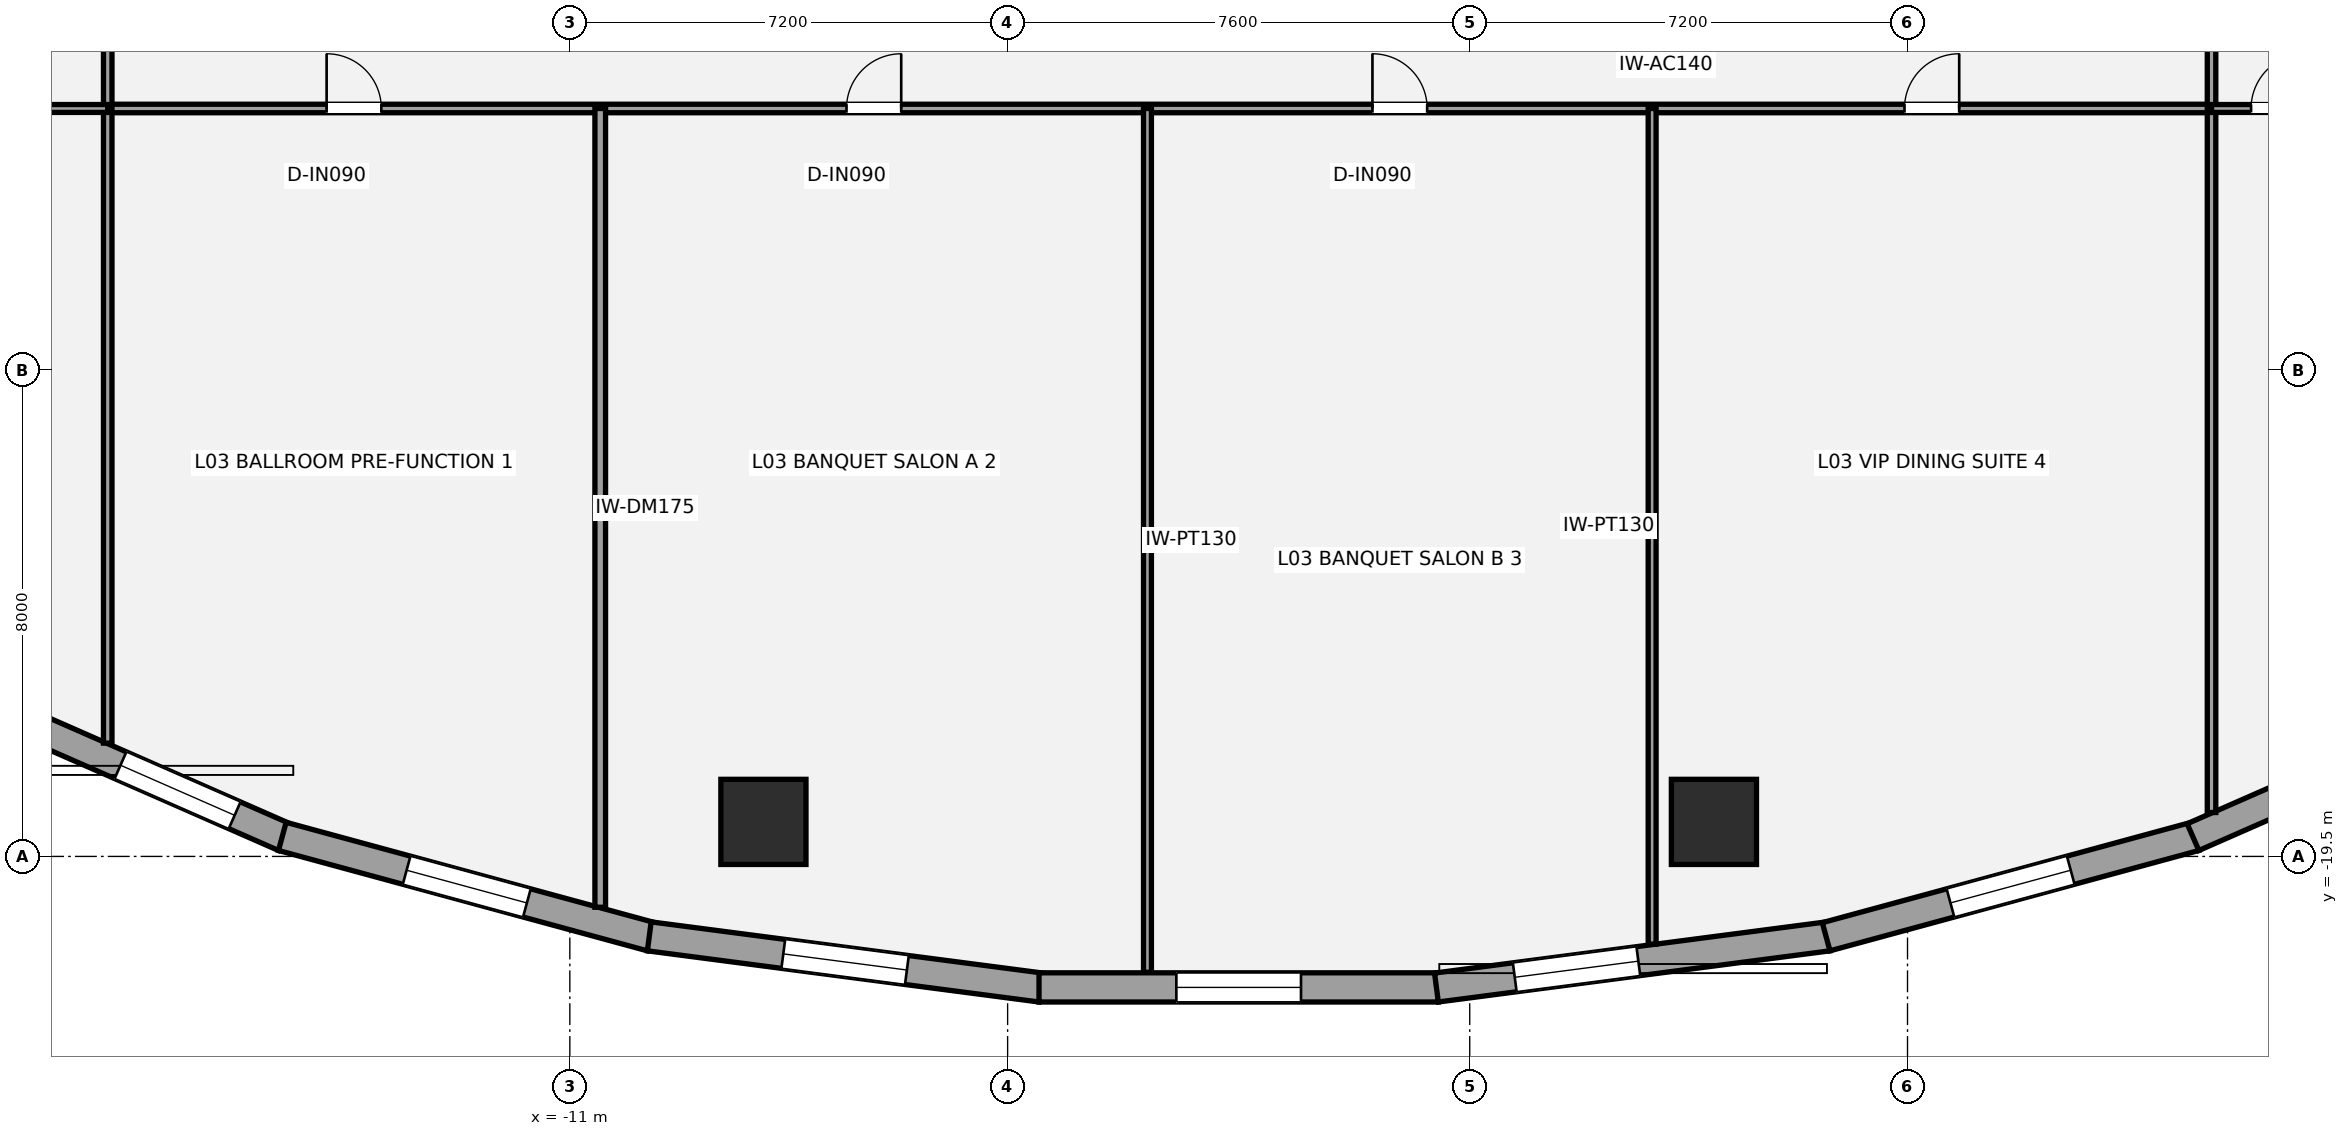
"""IFC4 building model, lengths in metres.
Left out: names, types, materials, properties, quantities, classifications, styles, units other than length and angle.
Written with IfcOpenShell. Run it as: python <this file> out.ifc"""

import sys

from ifc_helpers import new_model, si_unit, direction, frame, frame_2d, origin, origin_2d, place, context, subcontext, project, spatial, rectangle, hollow_circle, extrude, element, fill, save


model = new_model("IFC4")
c1 = context("Model", 3, precision=1e-05, world=origin(), true_north=direction((0.0, 1.0)))
c2 = subcontext(c1, "Body", "Model", "MODEL_VIEW")
j1 = project(units=[si_unit("LENGTHUNIT", "METRE"), si_unit("PLANEANGLEUNIT", "RADIAN")], contexts=[c1])
p1 = place(None, origin())
s1 = spatial("IfcSite", under=j1, at=p1, CompositionType="ELEMENT")
p2 = place(p1, origin())
s2 = spatial("IfcBuilding", under=s1, at=p2, CompositionType="ELEMENT")
p3 = place(p2, frame((0.0, 0.0, 14.4)))
s3 = spatial("IfcBuildingStorey", under=s2, at=p3, CompositionType="ELEMENT", Elevation=14.4)
for number, where, z_axis, x_axis in (
    (1, (-7.816, -18.932, 0.0), (0.0, 0.0, 1.0), (1.0, 0.0, 0.0)),
    (2, (7.816, -18.932, 0.0), (0.0, 0.0, 1.0), (1.0, 0.0, 0.0)),
):
    element("IfcColumn", number, at=place(p3, frame(where, z_axis=z_axis, x_axis=x_axis)), inside=s3, PredefinedType="USERDEFINED", context=c2, shape_type="SweptSolid", body=[
        extrude(hollow_circle(Radius=0.7, WallThickness=0.05, at=origin_2d()), origin(), (0.0, 0.0, 1.0), 4.2),
    ])
p4 = place(p3, frame((-15.695, -19.183, 0.0), z_axis=(0.0, 0.0, 1.0), x_axis=(-0.91570760638, 0.401845218484, 0.0)))
e3 = element("IfcWall", 3, at=p4, inside=s3, PredefinedType="STANDARD", context=c2, shape_type="SweptSolid", body=[
    extrude(rectangle(XDim=5.963, YDim=0.48, at=frame_2d((2.981, 0.0))), origin(), (0.0, 0.0, 1.0), 3.109),
])
p5 = place(p4, frame((0.893, 0.0, 0.72)))
e4 = element("IfcOpeningElement", 4, at=p5, cuts=e3, PredefinedType="OPENING", context=c2, shape_type="SweptSolid", body=[
    extrude(rectangle(XDim=2.05, YDim=1.8, at=frame_2d((1.025, 0.9))), frame((0.0, 0.25, 0.0), z_axis=(0.0, -1.0, 0.0), x_axis=(1.0, 0.0, 0.0)), (0.0, 0.0, 1.0), 0.5),
])
p6 = place(p3, frame((-9.662, -20.821, 0.0), z_axis=(0.0, 0.0, 1.0), x_axis=(-0.964936550718, 0.262483243445, 0.0)))
e5 = element("IfcWall", 5, at=p6, inside=s3, PredefinedType="STANDARD", context=c2, shape_type="SweptSolid", body=[
    extrude(rectangle(XDim=6.288, YDim=0.48, at=frame_2d((3.144, 0.0))), origin(), (0.0, 0.0, 1.0), 3.109),
])
p7 = place(p6, frame((2.119, 0.0, 0.72)))
e6 = element("IfcOpeningElement", 6, at=p7, cuts=e5, PredefinedType="OPENING", context=c2, shape_type="SweptSolid", body=[
    extrude(rectangle(XDim=2.05, YDim=1.8, at=frame_2d((1.025, 0.9))), frame((0.0, 0.25, 0.0), z_axis=(0.0, -1.0, 0.0), x_axis=(1.0, 0.0, 0.0)), (0.0, 0.0, 1.0), 0.5),
])
p8 = place(p3, frame((-3.252, -21.656, 0.0), z_axis=(0.0, 0.0, 1.0), x_axis=(-0.991576921472, 0.129519144545, 0.0)))
e7 = element("IfcWall", 7, at=p8, inside=s3, PredefinedType="STANDARD", context=c2, shape_type="SweptSolid", body=[
    extrude(rectangle(XDim=6.496, YDim=0.48, at=frame_2d((3.248, 0.0))), origin(), (0.0, 0.0, 1.0), 3.109),
])
p9 = place(p8, frame((2.223, 0.0, 0.72)))
e8 = element("IfcOpeningElement", 8, at=p9, cuts=e7, PredefinedType="OPENING", context=c2, shape_type="SweptSolid", body=[
    extrude(rectangle(XDim=2.05, YDim=1.8, at=frame_2d((1.025, 0.9))), frame((0.0, 0.25, 0.0), z_axis=(0.0, -1.0, 0.0), x_axis=(1.0, 0.0, 0.0)), (0.0, 0.0, 1.0), 0.5),
])
p10 = place(p3, frame((3.284, -21.654, 0.0), z_axis=(0.0, 0.0, 1.0), x_axis=(-1.0, 0.0, 0.0)))
e9 = element("IfcWall", 9, at=p10, inside=s3, PredefinedType="STANDARD", context=c2, shape_type="SweptSolid", body=[
    extrude(rectangle(XDim=6.567, YDim=0.48, at=frame_2d((3.284, 0.0))), origin(), (0.0, 0.0, 1.0), 3.109),
])
p11 = place(p10, frame((2.259, 0.0, 0.72)))
e10 = element("IfcOpeningElement", 10, at=p11, cuts=e9, PredefinedType="OPENING", context=c2, shape_type="SweptSolid", body=[
    extrude(rectangle(XDim=2.05, YDim=1.8, at=frame_2d((1.025, 0.9))), frame((0.0, 0.25, 0.0), z_axis=(0.0, -1.0, 0.0), x_axis=(1.0, 0.0, 0.0)), (0.0, 0.0, 1.0), 0.5),
])
p12 = place(p3, frame((9.693, -20.815, 0.0), z_axis=(0.0, 0.0, 1.0), x_axis=(-0.991576921472, -0.129519144545, 0.0)))
e11 = element("IfcWall", 11, at=p12, inside=s3, PredefinedType="STANDARD", context=c2, shape_type="SweptSolid", body=[
    extrude(rectangle(XDim=6.496, YDim=0.48, at=frame_2d((3.248, 0.0))), origin(), (0.0, 0.0, 1.0), 3.109),
])
p13 = place(p12, frame((3.147, 0.0, 0.72)))
e12 = element("IfcOpeningElement", 12, at=p13, cuts=e11, PredefinedType="OPENING", context=c2, shape_type="SweptSolid", body=[
    extrude(rectangle(XDim=2.05, YDim=1.8, at=frame_2d((1.025, 0.9))), frame((0.0, 0.25, 0.0), z_axis=(0.0, -1.0, 0.0), x_axis=(1.0, 0.0, 0.0)), (0.0, 0.0, 1.0), 0.5),
])
p14 = place(p3, frame((15.729, -19.171, 0.0), z_axis=(0.0, 0.0, 1.0), x_axis=(-0.964936550718, -0.262483243445, 0.0)))
e13 = element("IfcWall", 13, at=p14, inside=s3, PredefinedType="STANDARD", context=c2, shape_type="SweptSolid", body=[
    extrude(rectangle(XDim=6.288, YDim=0.48, at=frame_2d((3.144, 0.0))), origin(), (0.0, 0.0, 1.0), 3.109),
])
p15 = place(p14, frame((2.119, 0.0, 0.72)))
e14 = element("IfcOpeningElement", 14, at=p15, cuts=e13, PredefinedType="OPENING", context=c2, shape_type="SweptSolid", body=[
    extrude(rectangle(XDim=2.05, YDim=1.8, at=frame_2d((1.025, 0.9))), frame((0.0, 0.25, 0.0), z_axis=(0.0, -1.0, 0.0), x_axis=(1.0, 0.0, 0.0)), (0.0, 0.0, 1.0), 0.5),
])
p16 = place(p3, frame((21.156, -16.786, 0.0), z_axis=(0.0, 0.0, 1.0), x_axis=(-0.91570760638, -0.401845218484, 0.0)))
e15 = element("IfcWall", 15, at=p16, inside=s3, PredefinedType="STANDARD", context=c2, shape_type="SweptSolid", body=[
    extrude(rectangle(XDim=5.963, YDim=0.48, at=frame_2d((2.981, 0.0))), origin(), (0.0, 0.0, 1.0), 3.109),
])
p17 = place(p16, frame((1.957, 0.0, 0.72)))
e16 = element("IfcOpeningElement", 16, at=p17, cuts=e15, PredefinedType="OPENING", context=c2, shape_type="SweptSolid", body=[
    extrude(rectangle(XDim=2.05, YDim=1.8, at=frame_2d((1.025, 0.9))), frame((0.0, 0.25, 0.0), z_axis=(0.0, -1.0, 0.0), x_axis=(1.0, 0.0, 0.0)), (0.0, 0.0, 1.0), 0.5),
])
p18 = place(p3, frame((-18.6, -7.2, 0.0), z_axis=(0.0, 0.0, 1.0), x_axis=(1.0, 0.0, 0.0)))
e17 = element("IfcWall", 17, at=p18, inside=s3, PredefinedType="PARTITIONING", context=c2, shape_type="SweptSolid", body=[
    extrude(rectangle(XDim=34.6, YDim=0.14, at=frame_2d((17.3, 0.0))), origin(), (0.0, 0.0, 1.0), 3.98),
])
p19 = place(p18, frame((3.6, 0.0, 0.0)))
e18 = element("IfcOpeningElement", 18, at=p19, cuts=e17, PredefinedType="OPENING", context=c2, shape_type="SweptSolid", body=[
    extrude(rectangle(XDim=0.9, YDim=2.1, at=frame_2d((0.45, 1.05))), frame((0.0, 0.08, 0.0), z_axis=(0.0, -1.0, 0.0), x_axis=(1.0, 0.0, 0.0)), (0.0, 0.0, 1.0), 0.16),
])
p20 = place(p18, frame((12.15, 0.0, 0.0)))
e19 = element("IfcOpeningElement", 19, at=p20, cuts=e17, PredefinedType="OPENING", context=c2, shape_type="SweptSolid", body=[
    extrude(rectangle(XDim=0.9, YDim=2.1, at=frame_2d((0.45, 1.05))), frame((0.0, 0.08, 0.0), z_axis=(0.0, -1.0, 0.0), x_axis=(1.0, 0.0, 0.0)), (0.0, 0.0, 1.0), 0.16),
])
p21 = place(p18, frame((20.8, 0.0, 0.0)))
e20 = element("IfcOpeningElement", 20, at=p21, cuts=e17, PredefinedType="OPENING", context=c2, shape_type="SweptSolid", body=[
    extrude(rectangle(XDim=0.9, YDim=2.1, at=frame_2d((0.45, 1.05))), frame((0.0, 0.08, 0.0), z_axis=(0.0, -1.0, 0.0), x_axis=(1.0, 0.0, 0.0)), (0.0, 0.0, 1.0), 0.16),
])
p22 = place(p18, frame((29.55, 0.0, 0.0)))
e21 = element("IfcOpeningElement", 21, at=p22, cuts=e17, PredefinedType="OPENING", context=c2, shape_type="SweptSolid", body=[
    extrude(rectangle(XDim=0.9, YDim=2.1, at=frame_2d((0.45, 1.05))), frame((0.0, 0.08, 0.0), z_axis=(0.0, -1.0, 0.0), x_axis=(1.0, 0.0, 0.0)), (0.0, 0.0, 1.0), 0.16),
])
p23 = place(p3, frame((-18.6, -17.637, 0.0), z_axis=(0.0, 0.0, 1.0), x_axis=(0.0, 1.0, 0.0)))
e22 = element("IfcWall", 22, at=p23, inside=s3, PredefinedType="PARTITIONING", context=c2, shape_type="SweptSolid", body=[
    extrude(rectangle(XDim=25.187, YDim=0.14, at=frame_2d((12.594, 0.0))), origin(), (0.0, 0.0, 1.0), 3.348),
])
p24 = place(p23, frame((14.487, 0.0, 0.0)))
e23 = element("IfcOpeningElement", 23, at=p24, cuts=e22, PredefinedType="OPENING", context=c2, shape_type="SweptSolid", body=[
    extrude(rectangle(XDim=0.9, YDim=2.1, at=frame_2d((0.45, 1.05))), frame((0.0, 0.08, 0.0), z_axis=(0.0, -1.0, 0.0), x_axis=(1.0, 0.0, 0.0)), (0.0, 0.0, 1.0), 0.16),
])
p25 = place(p23, frame((21.862, 0.0, 0.0)))
e24 = element("IfcOpeningElement", 24, at=p25, cuts=e22, PredefinedType="OPENING", context=c2, shape_type="SweptSolid", body=[
    extrude(rectangle(XDim=0.9, YDim=2.1, at=frame_2d((0.45, 1.05))), frame((0.0, 0.08, 0.0), z_axis=(0.0, -1.0, 0.0), x_axis=(1.0, 0.0, 0.0)), (0.0, 0.0, 1.0), 0.16),
])
p26 = place(p3, frame((16.0, -18.778, 0.0), z_axis=(0.0, 0.0, 1.0), x_axis=(0.0, 1.0, 0.0)))
e25 = element("IfcWall", 25, at=p26, inside=s3, PredefinedType="PARTITIONING", context=c2, shape_type="SweptSolid", body=[
    extrude(rectangle(XDim=26.328, YDim=0.14, at=frame_2d((13.164, 0.0))), origin(), (0.0, 0.0, 1.0), 3.348),
])
p27 = place(p26, frame((13.628, 0.0, 0.0)))
e26 = element("IfcOpeningElement", 26, at=p27, cuts=e25, PredefinedType="OPENING", context=c2, shape_type="SweptSolid", body=[
    extrude(rectangle(XDim=0.9, YDim=2.1, at=frame_2d((0.45, 1.05))), frame((0.0, 0.08, 0.0), z_axis=(0.0, -1.0, 0.0), x_axis=(1.0, 0.0, 0.0)), (0.0, 0.0, 1.0), 0.16),
])
p28 = place(p26, frame((18.528, 0.0, 0.0)))
e27 = element("IfcOpeningElement", 27, at=p28, cuts=e25, PredefinedType="OPENING", context=c2, shape_type="SweptSolid", body=[
    extrude(rectangle(XDim=0.9, YDim=2.1, at=frame_2d((0.45, 1.05))), frame((0.0, 0.08, 0.0), z_axis=(0.0, -1.0, 0.0), x_axis=(1.0, 0.0, 0.0)), (0.0, 0.0, 1.0), 0.16),
])
p29 = place(p26, frame((23.403, 0.0, 0.0)))
e28 = element("IfcOpeningElement", 28, at=p29, cuts=e25, PredefinedType="OPENING", context=c2, shape_type="SweptSolid", body=[
    extrude(rectangle(XDim=0.9, YDim=2.1, at=frame_2d((0.45, 1.05))), frame((0.0, 0.08, 0.0), z_axis=(0.0, -1.0, 0.0), x_axis=(1.0, 0.0, 0.0)), (0.0, 0.0, 1.0), 0.16),
])
p30 = place(p3, frame((-10.5, -20.336, 0.0), z_axis=(0.0, 0.0, 1.0), x_axis=(0.0, 1.0, 0.0)))
e29 = element("IfcWall", 29, at=p30, inside=s3, PredefinedType="PARTITIONING", context=c2, shape_type="SweptSolid", body=[
    extrude(rectangle(XDim=13.136, YDim=0.175, at=frame_2d((6.568, 0.0))), origin(), (0.0, 0.0, 1.0), 3.98),
])
p31 = place(p3, frame((-1.5, -21.406, 0.0), z_axis=(0.0, 0.0, 1.0), x_axis=(0.0, 1.0, 0.0)))
e30 = element("IfcWall", 30, at=p31, inside=s3, PredefinedType="PARTITIONING", context=c2, shape_type="SweptSolid", body=[
    extrude(rectangle(XDim=14.206, YDim=0.13, at=frame_2d((7.103, 0.0))), origin(), (0.0, 0.0, 1.0), 3.98),
])
p32 = place(p3, frame((6.8, -20.943, 0.0), z_axis=(0.0, 0.0, 1.0), x_axis=(0.0, 1.0, 0.0)))
e31 = element("IfcWall", 31, at=p32, inside=s3, PredefinedType="PARTITIONING", context=c2, shape_type="SweptSolid", body=[
    extrude(rectangle(XDim=13.743, YDim=0.13, at=frame_2d((6.871, 0.0))), origin(), (0.0, 0.0, 1.0), 3.348),
])
p33 = place(p3, frame((-30.967, -7.2, 0.0), z_axis=(0.0, 0.0, 1.0), x_axis=(1.0, 0.0, 0.0)))
e32 = element("IfcWall", 32, at=p33, inside=s3, PredefinedType="PARTITIONING", context=c2, shape_type="SweptSolid", body=[
    extrude(rectangle(XDim=12.367, YDim=0.13, at=frame_2d((6.184, 0.0))), origin(), (0.0, 0.0, 1.0), 2.958),
])
p34 = place(p33, frame((0.63, 0.0, 0.0)))
e33 = element("IfcOpeningElement", 33, at=p34, cuts=e32, PredefinedType="OPENING", context=c2, shape_type="SweptSolid", body=[
    extrude(rectangle(XDim=0.9, YDim=2.1, at=frame_2d((0.45, 1.05))), frame((0.0, 0.075, 0.0), z_axis=(0.0, -1.0, 0.0), x_axis=(1.0, 0.0, 0.0)), (0.0, 0.0, 1.0), 0.15),
])
p35 = place(p3, frame((16.0, -7.2, 0.0), z_axis=(0.0, 0.0, 1.0), x_axis=(1.0, 0.0, 0.0)))
e34 = element("IfcWall", 34, at=p35, inside=s3, PredefinedType="PARTITIONING", context=c2, shape_type="SweptSolid", body=[
    extrude(rectangle(XDim=14.967, YDim=0.13, at=frame_2d((7.484, 0.0))), origin(), (0.0, 0.0, 1.0), 2.958),
])
p36 = place(p35, frame((0.65, 0.0, 0.0)))
e35 = element("IfcOpeningElement", 35, at=p36, cuts=e34, PredefinedType="OPENING", context=c2, shape_type="SweptSolid", body=[
    extrude(rectangle(XDim=0.9, YDim=2.1, at=frame_2d((0.45, 1.05))), frame((0.0, 0.075, 0.0), z_axis=(0.0, -1.0, 0.0), x_axis=(1.0, 0.0, 0.0)), (0.0, 0.0, 1.0), 0.15),
])
p37 = place(p5, origin())
e36 = element("IfcWindow", 36, at=p37, inside=s3, PartitioningType="SINGLE_PANEL", PredefinedType="WINDOW", context=c2, shape_type="SweptSolid", body=[
    extrude(rectangle(XDim=2.05, YDim=1.8, at=frame_2d((1.025, 0.9))), frame((0.0, -0.01, 0.0), z_axis=(0.0, -1.0, 0.0), x_axis=(1.0, 0.0, 0.0)), (0.0, 0.0, 1.0), 0.06),
])
fill(e4, e36)
p38 = place(p7, origin())
e37 = element("IfcWindow", 37, at=p38, inside=s3, PartitioningType="SINGLE_PANEL", PredefinedType="WINDOW", context=c2, shape_type="SweptSolid", body=[
    extrude(rectangle(XDim=2.05, YDim=1.8, at=frame_2d((1.025, 0.9))), frame((0.0, -0.01, 0.0), z_axis=(0.0, -1.0, 0.0), x_axis=(1.0, 0.0, 0.0)), (0.0, 0.0, 1.0), 0.06),
])
fill(e6, e37)
p39 = place(p9, origin())
e38 = element("IfcWindow", 38, at=p39, inside=s3, PartitioningType="SINGLE_PANEL", PredefinedType="WINDOW", context=c2, shape_type="SweptSolid", body=[
    extrude(rectangle(XDim=2.05, YDim=1.8, at=frame_2d((1.025, 0.9))), frame((0.0, -0.01, 0.0), z_axis=(0.0, -1.0, 0.0), x_axis=(1.0, 0.0, 0.0)), (0.0, 0.0, 1.0), 0.06),
])
fill(e8, e38)
p40 = place(p11, origin())
e39 = element("IfcWindow", 39, at=p40, inside=s3, PartitioningType="SINGLE_PANEL", PredefinedType="WINDOW", context=c2, shape_type="SweptSolid", body=[
    extrude(rectangle(XDim=2.05, YDim=1.8, at=frame_2d((1.025, 0.9))), frame((0.0, -0.01, 0.0), z_axis=(0.0, -1.0, 0.0), x_axis=(1.0, 0.0, 0.0)), (0.0, 0.0, 1.0), 0.06),
])
fill(e10, e39)
p41 = place(p13, origin())
e40 = element("IfcWindow", 40, at=p41, inside=s3, PartitioningType="SINGLE_PANEL", PredefinedType="WINDOW", context=c2, shape_type="SweptSolid", body=[
    extrude(rectangle(XDim=2.05, YDim=1.8, at=frame_2d((1.025, 0.9))), frame((0.0, -0.01, 0.0), z_axis=(0.0, -1.0, 0.0), x_axis=(1.0, 0.0, 0.0)), (0.0, 0.0, 1.0), 0.06),
])
fill(e12, e40)
p42 = place(p15, origin())
e41 = element("IfcWindow", 41, at=p42, inside=s3, PartitioningType="SINGLE_PANEL", PredefinedType="WINDOW", context=c2, shape_type="SweptSolid", body=[
    extrude(rectangle(XDim=2.05, YDim=1.8, at=frame_2d((1.025, 0.9))), frame((0.0, -0.01, 0.0), z_axis=(0.0, -1.0, 0.0), x_axis=(1.0, 0.0, 0.0)), (0.0, 0.0, 1.0), 0.06),
])
fill(e14, e41)
p43 = place(p19, origin())
e42 = element("IfcDoor", 42, at=p43, inside=s3, OperationType="SINGLE_SWING_LEFT", PredefinedType="DOOR", context=c2, shape_type="SweptSolid", body=[
    extrude(rectangle(XDim=0.9, YDim=2.1, at=frame_2d((0.45, 1.05))), frame((0.0, 0.025, 0.0), z_axis=(0.0, -1.0, 0.0), x_axis=(1.0, 0.0, 0.0)), (0.0, 0.0, 1.0), 0.05),
])
fill(e18, e42)
p44 = place(p20, origin())
e43 = element("IfcDoor", 43, at=p44, inside=s3, OperationType="SINGLE_SWING_RIGHT", PredefinedType="DOOR", context=c2, shape_type="SweptSolid", body=[
    extrude(rectangle(XDim=0.9, YDim=2.1, at=frame_2d((0.45, 1.05))), frame((0.0, 0.025, 0.0), z_axis=(0.0, -1.0, 0.0), x_axis=(1.0, 0.0, 0.0)), (0.0, 0.0, 1.0), 0.05),
])
fill(e19, e43)
p45 = place(p21, origin())
e44 = element("IfcDoor", 44, at=p45, inside=s3, OperationType="SINGLE_SWING_LEFT", PredefinedType="DOOR", context=c2, shape_type="SweptSolid", body=[
    extrude(rectangle(XDim=0.9, YDim=2.1, at=frame_2d((0.45, 1.05))), frame((0.0, 0.025, 0.0), z_axis=(0.0, -1.0, 0.0), x_axis=(1.0, 0.0, 0.0)), (0.0, 0.0, 1.0), 0.05),
])
fill(e20, e44)
p46 = place(p22, origin())
e45 = element("IfcDoor", 45, at=p46, inside=s3, OperationType="SINGLE_SWING_RIGHT", PredefinedType="DOOR", context=c2, shape_type="SweptSolid", body=[
    extrude(rectangle(XDim=0.9, YDim=2.1, at=frame_2d((0.45, 1.05))), frame((0.0, 0.025, 0.0), z_axis=(0.0, -1.0, 0.0), x_axis=(1.0, 0.0, 0.0)), (0.0, 0.0, 1.0), 0.05),
])
fill(e21, e45)
p47 = place(p36, origin())
e46 = element("IfcDoor", 46, at=p47, inside=s3, OperationType="SINGLE_SWING_RIGHT", PredefinedType="DOOR", context=c2, shape_type="SweptSolid", body=[
    extrude(rectangle(XDim=0.9, YDim=2.1, at=frame_2d((0.45, 1.05))), frame((0.0, 0.025, 0.0), z_axis=(0.0, -1.0, 0.0), x_axis=(1.0, 0.0, 0.0)), (0.0, 0.0, 1.0), 0.05),
])
fill(e35, e46)
save(model, sys.argv[1])
